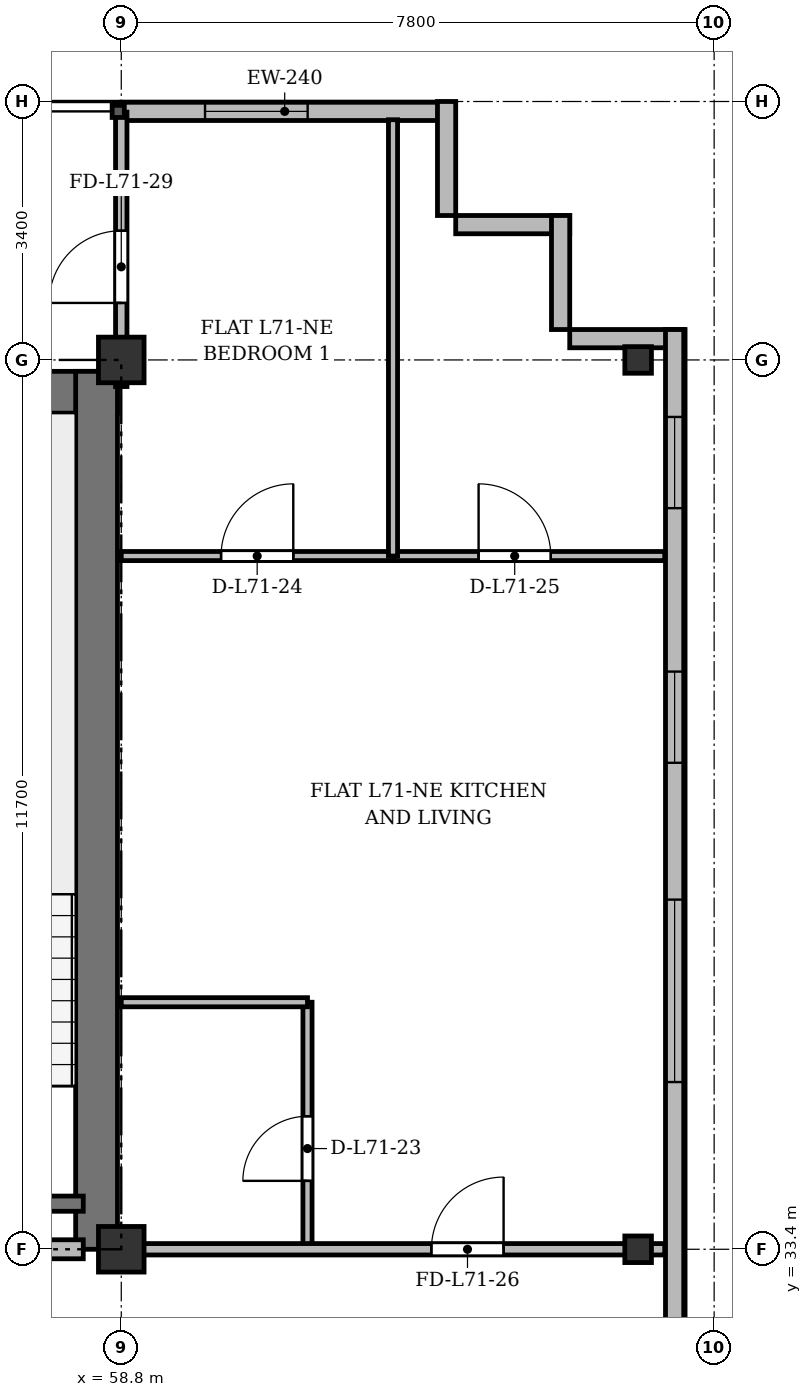
"""IFC4 building model, lengths in metres.
Left out: names, types, materials, properties, quantities, classifications, styles, units other than length and angle.
Written with IfcOpenShell. Run it as: python <this file> out.ifc"""

import sys

from ifc_helpers import new_model, si_unit, direction, frame, frame_2d, origin, origin_2d, place, context, subcontext, project, spatial, rectangle, i_section, extrude, source, transform, mapped, element, fill, save


model = new_model("IFC4")
c1 = context("Model", 3, precision=1e-05, world=origin(), true_north=direction((0.0, 1.0)))
c2 = subcontext(c1, "Body", "Model", "MODEL_VIEW")
j1 = project(units=[si_unit("LENGTHUNIT", "METRE"), si_unit("PLANEANGLEUNIT", "RADIAN")], contexts=[c1])
p1 = place(None, origin())
s1 = spatial("IfcSite", under=j1, at=p1, CompositionType="ELEMENT")
p2 = place(p1, origin())
s2 = spatial("IfcBuilding", under=s1, at=p2, CompositionType="ELEMENT")
p3 = place(p2, frame((0.0, 0.0, 273.9)))
s3 = spatial("IfcBuildingStorey", under=s2, at=p3, CompositionType="ELEMENT", Elevation=273.9)
m1 = source(origin(), c2, "Body", "SweptSolid", [
    extrude(rectangle(XDim=0.6, YDim=0.6, at=origin_2d()), origin(), (0.0, 0.0, 1.0), 3.6),
])
for number, where, z_axis, x_axis in (
    (1, (58.8, 33.4, 0.0), (0.0, 0.0, 1.0), (1.0, 0.0, 0.0)),
    (2, (58.8, 45.1, 0.0), (0.0, 0.0, 1.0), (1.0, 0.0, 0.0)),
):
    element("IfcColumn", number, at=place(p3, frame(where, z_axis=z_axis, x_axis=x_axis)), inside=s3, PredefinedType="COLUMN", context=c2, shape_type="MappedRepresentation", body=[
        mapped(m1, transform((0.0, 0.0, 0.0), x_axis=(1.0, 0.0, 0.0), y_axis=(0.0, 1.0, 0.0), z_axis=(0.0, 0.0, 1.0), scale=1.0)),
    ])
m2 = source(origin(), c2, "Body", "SweptSolid", [
    extrude(i_section(OverallWidth=0.35, OverallDepth=0.35, WebThickness=0.018, FlangeThickness=0.028, at=origin_2d()), origin(), (0.0, 0.0, 1.0), 3.6),
])
for number, where, z_axis, x_axis in (
    (3, (65.6, 33.4, 0.0), (0.0, 0.0, 1.0), (1.0, 0.0, 0.0)),
    (4, (65.6, 45.1, 0.0), (0.0, 0.0, 1.0), (1.0, 0.0, 0.0)),
):
    element("IfcColumn", number, at=place(p3, frame(where, z_axis=z_axis, x_axis=x_axis)), inside=s3, PredefinedType="COLUMN", context=c2, shape_type="MappedRepresentation", body=[
        mapped(m2, transform((0.0, 0.0, 0.0), x_axis=(1.0, 0.0, 0.0), y_axis=(0.0, 1.0, 0.0), z_axis=(0.0, 0.0, 1.0), scale=1.0)),
    ])
p4 = place(p3, frame((58.8, 48.37, 0.0), z_axis=(0.0, 0.0, 1.0), x_axis=(1.0, 0.0, 0.0)))
e5 = element("IfcWall", 5, at=p4, inside=s3, PredefinedType="SOLIDWALL", context=c2, shape_type="SweptSolid", body=[
    extrude(rectangle(XDim=4.3, YDim=0.24, at=frame_2d((2.15, 0.0))), origin(), (0.0, 0.0, 1.0), 3.37),
])
p5 = place(p4, frame((1.102, 0.0, 0.9)))
e6 = element("IfcOpeningElement", 6, at=p5, cuts=e5, PredefinedType="OPENING", context=c2, shape_type="SweptSolid", body=[
    extrude(rectangle(XDim=1.35, YDim=1.5, at=frame_2d((0.675, 0.75))), frame((0.0, 0.13, 0.0), z_axis=(0.0, -1.0, 0.0), x_axis=(1.0, 0.0, 0.0)), (0.0, 0.0, 1.0), 0.26),
])
for number, where, z_axis, x_axis in (
    (7, (63.08, 48.5, 0.0), (0.0, 0.0, 1.0), (0.0, -1.0, 0.0)),
    (8, (63.2, 46.88, 0.0), (0.0, 0.0, 1.0), (1.0, 0.0, 0.0)),
    (9, (64.58, 47.0, 0.0), (0.0, 0.0, 1.0), (0.0, -1.0, 0.0)),
    (10, (64.7, 45.38, 0.0), (0.0, 0.0, 1.0), (1.0, 0.0, 0.0)),
):
    element("IfcWall", number, at=place(p3, frame(where, z_axis=z_axis, x_axis=x_axis)), inside=s3, PredefinedType="SOLIDWALL", context=c2, shape_type="SweptSolid", body=[
        extrude(rectangle(XDim=1.5, YDim=0.24, at=frame_2d((0.75, 0.0))), origin(), (0.0, 0.0, 1.0), 3.37),
    ])
p6 = place(p3, frame((66.08, 45.5, 0.0), z_axis=(0.0, 0.0, 1.0), x_axis=(0.0, -1.0, 0.0)))
e11 = element("IfcWall", 11, at=p6, inside=s3, PredefinedType="SOLIDWALL", context=c2, shape_type="SweptSolid", body=[
    extrude(rectangle(XDim=39.0, YDim=0.24, at=frame_2d((19.5, 0.0))), origin(), (0.0, 0.0, 1.0), 3.37),
])
p7 = place(p6, frame((36.35, 0.0, 0.92)))
e12 = element("IfcOpeningElement", 12, at=p7, cuts=e11, PredefinedType="OPENING", context=c2, shape_type="SweptSolid", body=[
    extrude(rectangle(XDim=1.2, YDim=1.65, at=frame_2d((0.6, 0.825))), frame((0.0, 0.13, 0.0), z_axis=(0.0, -1.0, 0.0), x_axis=(1.0, 0.0, 0.0)), (0.0, 0.0, 1.0), 0.26),
])
p8 = place(p6, frame((32.9, 0.0, 0.92)))
e13 = element("IfcOpeningElement", 13, at=p8, cuts=e11, PredefinedType="OPENING", context=c2, shape_type="SweptSolid", body=[
    extrude(rectangle(XDim=2.4, YDim=2.1, at=frame_2d((1.2, 1.05))), frame((0.0, 0.13, 0.0), z_axis=(0.0, -1.0, 0.0), x_axis=(1.0, 0.0, 0.0)), (0.0, 0.0, 1.0), 0.26),
])
p9 = place(p6, frame((28.7, 0.0, 0.92)))
e14 = element("IfcOpeningElement", 14, at=p9, cuts=e11, PredefinedType="OPENING", context=c2, shape_type="SweptSolid", body=[
    extrude(rectangle(XDim=2.4, YDim=2.1, at=frame_2d((1.2, 1.05))), frame((0.0, 0.13, 0.0), z_axis=(0.0, -1.0, 0.0), x_axis=(1.0, 0.0, 0.0)), (0.0, 0.0, 1.0), 0.26),
])
p10 = place(p6, frame((21.5, 0.0, 0.92)))
e15 = element("IfcOpeningElement", 15, at=p10, cuts=e11, PredefinedType="OPENING", context=c2, shape_type="SweptSolid", body=[
    extrude(rectangle(XDim=2.4, YDim=2.1, at=frame_2d((1.2, 1.05))), frame((0.0, 0.13, 0.0), z_axis=(0.0, -1.0, 0.0), x_axis=(1.0, 0.0, 0.0)), (0.0, 0.0, 1.0), 0.26),
])
p11 = place(p6, frame((7.5, 0.0, 0.92)))
e16 = element("IfcOpeningElement", 16, at=p11, cuts=e11, PredefinedType="OPENING", context=c2, shape_type="SweptSolid", body=[
    extrude(rectangle(XDim=2.4, YDim=2.1, at=frame_2d((1.2, 1.05))), frame((0.0, 0.13, 0.0), z_axis=(0.0, -1.0, 0.0), x_axis=(1.0, 0.0, 0.0)), (0.0, 0.0, 1.0), 0.26),
])
p12 = place(p6, frame((4.5, 0.0, 0.92)))
e17 = element("IfcOpeningElement", 17, at=p12, cuts=e11, PredefinedType="OPENING", context=c2, shape_type="SweptSolid", body=[
    extrude(rectangle(XDim=1.2, YDim=1.65, at=frame_2d((0.6, 0.825))), frame((0.0, 0.13, 0.0), z_axis=(0.0, -1.0, 0.0), x_axis=(1.0, 0.0, 0.0)), (0.0, 0.0, 1.0), 0.26),
])
p13 = place(p6, frame((1.15, 0.0, 0.92)))
e18 = element("IfcOpeningElement", 18, at=p13, cuts=e11, PredefinedType="OPENING", context=c2, shape_type="SweptSolid", body=[
    extrude(rectangle(XDim=1.2, YDim=1.65, at=frame_2d((0.6, 0.825))), frame((0.0, 0.13, 0.0), z_axis=(0.0, -1.0, 0.0), x_axis=(1.0, 0.0, 0.0)), (0.0, 0.0, 1.0), 0.26),
])
p14 = place(p3, frame((15.65, 44.675, 0.0), z_axis=(0.0, 0.0, 1.0), x_axis=(1.0, 0.0, 0.0)))
e19 = element("IfcWall", 19, at=p14, inside=s3, PredefinedType="SHEAR", context=c2, shape_type="SweptSolid", body=[
    extrude(rectangle(XDim=43.1, YDim=0.55, at=frame_2d((21.55, 0.0))), origin(), (0.0, 0.0, 1.0), 3.37),
])
p15 = place(p3, frame((58.475, 33.4, 0.0), z_axis=(0.0, 0.0, 1.0), x_axis=(0.0, 1.0, 0.0)))
e20 = element("IfcWall", 20, at=p15, inside=s3, PredefinedType="SHEAR", context=c2, shape_type="SweptSolid", body=[
    extrude(rectangle(XDim=11.55, YDim=0.55, at=frame_2d((5.775, 0.0))), origin(), (0.0, 0.0, 1.0), 3.37),
])
p16 = place(p3, frame((54.9, 34.0, 0.0), z_axis=(0.0, 0.0, 1.0), x_axis=(1.0, 0.0, 0.0)))
e21 = element("IfcWall", 21, at=p16, inside=s3, PredefinedType="SHEAR", context=c2, shape_type="SweptSolid", body=[
    extrude(rectangle(XDim=3.4, YDim=0.2, at=frame_2d((1.7, 0.0))), origin(), (0.0, 0.0, 1.0), 3.37),
])
p17 = place(p3, frame((47.15, 33.4, 0.0), z_axis=(0.0, 0.0, 1.0), x_axis=(1.0, 0.0, 0.0)))
e22 = element("IfcWall", 22, at=p17, inside=s3, PredefinedType="PARTITIONING", context=c2, shape_type="SweptSolid", body=[
    extrude(rectangle(XDim=11.15, YDim=0.25, at=frame_2d((5.575, 0.0))), origin(), (0.0, 0.0, 1.0), 2.92),
])
p18 = place(p17, frame((0.7, 0.0, 0.0)))
e23 = element("IfcOpeningElement", 23, at=p18, cuts=e22, PredefinedType="OPENING", context=c2, shape_type="SweptSolid", body=[
    extrude(rectangle(XDim=0.95, YDim=2.15, at=frame_2d((0.475, 1.075))), frame((0.0, 0.135, 0.0), z_axis=(0.0, -1.0, 0.0), x_axis=(1.0, 0.0, 0.0)), (0.0, 0.0, 1.0), 0.27),
])
p19 = place(p17, frame((6.0, 0.0, 0.0)))
e24 = element("IfcOpeningElement", 24, at=p19, cuts=e22, PredefinedType="OPENING", context=c2, shape_type="SweptSolid", body=[
    extrude(rectangle(XDim=1.2, YDim=2.15, at=frame_2d((0.6, 1.075))), frame((0.0, 0.135, 0.0), z_axis=(0.0, -1.0, 0.0), x_axis=(1.0, 0.0, 0.0)), (0.0, 0.0, 1.0), 0.27),
])
p20 = place(p3, frame((61.25, 33.4, 0.0), z_axis=(0.0, 0.0, 1.0), x_axis=(0.0, 1.0, 0.0)))
e25 = element("IfcWall", 25, at=p20, inside=s3, PredefinedType="PARTITIONING", context=c2, shape_type="SweptSolid", body=[
    extrude(rectangle(XDim=3.25, YDim=0.12, at=frame_2d((1.625, 0.0))), origin(), (0.0, 0.0, 1.0), 2.92),
])
p21 = place(p20, frame((0.9, 0.0, 0.0)))
e26 = element("IfcOpeningElement", 26, at=p21, cuts=e25, PredefinedType="OPENING", context=c2, shape_type="SweptSolid", body=[
    extrude(rectangle(XDim=0.85, YDim=2.1, at=frame_2d((0.425, 1.05))), frame((0.0, 0.07, 0.0), z_axis=(0.0, -1.0, 0.0), x_axis=(1.0, 0.0, 0.0)), (0.0, 0.0, 1.0), 0.14),
])
p22 = place(p3, frame((58.8, 36.65, 0.0), z_axis=(0.0, 0.0, 1.0), x_axis=(1.0, 0.0, 0.0)))
e27 = element("IfcWall", 27, at=p22, inside=s3, PredefinedType="PARTITIONING", context=c2, shape_type="SweptSolid", body=[
    extrude(rectangle(XDim=2.45, YDim=0.12, at=frame_2d((1.225, 0.0))), origin(), (0.0, 0.0, 1.0), 2.87),
])
p23 = place(p3, frame((58.8, 42.52, 0.0), z_axis=(0.0, 0.0, 1.0), x_axis=(1.0, 0.0, 0.0)))
e28 = element("IfcWall", 28, at=p23, inside=s3, PredefinedType="PARTITIONING", context=c2, shape_type="SweptSolid", body=[
    extrude(rectangle(XDim=3.575, YDim=0.12, at=frame_2d((1.788, 0.0))), origin(), (0.0, 0.0, 1.0), 2.87),
])
p24 = place(p23, frame((1.313, 0.0, 0.0)))
e29 = element("IfcOpeningElement", 29, at=p24, cuts=e28, PredefinedType="OPENING", context=c2, shape_type="SweptSolid", body=[
    extrude(rectangle(XDim=0.95, YDim=2.15, at=frame_2d((0.475, 1.075))), frame((0.0, 0.07, 0.0), z_axis=(0.0, -1.0, 0.0), x_axis=(1.0, 0.0, 0.0)), (0.0, 0.0, 1.0), 0.14),
])
p25 = place(p3, frame((62.375, 42.52, 0.0), z_axis=(0.0, 0.0, 1.0), x_axis=(1.0, 0.0, 0.0)))
e30 = element("IfcWall", 30, at=p25, inside=s3, PredefinedType="PARTITIONING", context=c2, shape_type="SweptSolid", body=[
    extrude(rectangle(XDim=3.575, YDim=0.12, at=frame_2d((1.788, 0.0))), origin(), (0.0, 0.0, 1.0), 2.87),
])
p26 = place(p25, frame((1.126, 0.0, 0.0)))
e31 = element("IfcOpeningElement", 31, at=p26, cuts=e30, PredefinedType="OPENING", context=c2, shape_type="SweptSolid", body=[
    extrude(rectangle(XDim=0.95, YDim=2.15, at=frame_2d((0.475, 1.075))), frame((0.0, 0.07, 0.0), z_axis=(0.0, -1.0, 0.0), x_axis=(1.0, 0.0, 0.0)), (0.0, 0.0, 1.0), 0.14),
])
p27 = place(p3, frame((62.375, 42.52, 0.0), z_axis=(0.0, 0.0, 1.0), x_axis=(0.0, 1.0, 0.0)))
e32 = element("IfcWall", 32, at=p27, inside=s3, PredefinedType="PARTITIONING", context=c2, shape_type="SweptSolid", body=[
    extrude(rectangle(XDim=5.74, YDim=0.12, at=frame_2d((2.87, 0.0))), origin(), (0.0, 0.0, 1.0), 2.92),
])
p28 = place(p3, frame((58.8, 33.4, 0.0), z_axis=(0.0, 0.0, 1.0), x_axis=(1.0, 0.0, 0.0)))
e33 = element("IfcWall", 33, at=p28, inside=s3, PredefinedType="PARTITIONING", context=c2, shape_type="SweptSolid", body=[
    extrude(rectangle(XDim=7.15, YDim=0.15, at=frame_2d((3.575, 0.0))), origin(), (0.0, 0.0, 1.0), 2.92),
])
p29 = place(p28, frame((4.08, 0.0, 0.0)))
e34 = element("IfcOpeningElement", 34, at=p29, cuts=e33, PredefinedType="OPENING", context=c2, shape_type="SweptSolid", body=[
    extrude(rectangle(XDim=0.95, YDim=2.15, at=frame_2d((0.475, 1.075))), frame((0.0, 0.085, 0.0), z_axis=(0.0, -1.0, 0.0), x_axis=(1.0, 0.0, 0.0)), (0.0, 0.0, 1.0), 0.17),
])
p30 = place(p3, frame((58.8, 44.75, 0.0), z_axis=(0.0, 0.0, 1.0), x_axis=(0.0, 1.0, 0.0)))
e35 = element("IfcWall", 35, at=p30, inside=s3, PredefinedType="PARTITIONING", context=c2, shape_type="SweptSolid", body=[
    extrude(rectangle(XDim=3.61, YDim=0.15, at=frame_2d((1.805, 0.0))), origin(), (0.0, 0.0, 1.0), 2.87),
])
p31 = place(p30, frame((1.1, 0.0, 0.0)))
e36 = element("IfcOpeningElement", 36, at=p31, cuts=e35, PredefinedType="OPENING", context=c2, shape_type="SweptSolid", body=[
    extrude(rectangle(XDim=0.95, YDim=2.15, at=frame_2d((0.475, 1.075))), frame((0.0, 0.085, 0.0), z_axis=(0.0, -1.0, 0.0), x_axis=(1.0, 0.0, 0.0)), (0.0, 0.0, 1.0), 0.17),
])
m3 = source(origin(), c2, "Body", "SweptSolid", [
    extrude(rectangle(XDim=1.35, YDim=1.5, at=frame_2d((0.675, 0.75))), frame((0.0, 0.03, 0.0), z_axis=(0.0, -1.0, 0.0), x_axis=(1.0, 0.0, 0.0)), (0.0, 0.0, 1.0), 0.06),
])
p32 = place(p5, origin())
e37 = element("IfcWindow", 37, at=p32, inside=s3, PartitioningType="SINGLE_PANEL", PredefinedType="WINDOW", context=c2, shape_type="MappedRepresentation", body=[
    mapped(m3, transform((0.0, 0.0, 0.0), x_axis=(1.0, 0.0, 0.0), y_axis=(0.0, 1.0, 0.0), z_axis=(0.0, 0.0, 1.0), scale=1.0)),
])
fill(e6, e37)
m4 = source(origin(), c2, "Body", "SweptSolid", [
    extrude(rectangle(XDim=2.4, YDim=2.1, at=frame_2d((1.2, 1.05))), frame((0.0, 0.03, 0.0), z_axis=(0.0, -1.0, 0.0), x_axis=(1.0, 0.0, 0.0)), (0.0, 0.0, 1.0), 0.06),
])
p33 = place(p11, origin())
e38 = element("IfcWindow", 38, at=p33, inside=s3, PartitioningType="SINGLE_PANEL", PredefinedType="WINDOW", context=c2, shape_type="MappedRepresentation", body=[
    mapped(m4, transform((0.0, 0.0, 0.0), x_axis=(1.0, 0.0, 0.0), y_axis=(0.0, 1.0, 0.0), z_axis=(0.0, 0.0, 1.0), scale=1.0)),
])
fill(e16, e38)
m5 = source(origin(), c2, "Body", "SweptSolid", [
    extrude(rectangle(XDim=1.2, YDim=1.65, at=frame_2d((0.6, 0.825))), frame((0.0, 0.03, 0.0), z_axis=(0.0, -1.0, 0.0), x_axis=(1.0, 0.0, 0.0)), (0.0, 0.0, 1.0), 0.06),
])
p34 = place(p12, origin())
e39 = element("IfcWindow", 39, at=p34, inside=s3, PartitioningType="SINGLE_PANEL", PredefinedType="WINDOW", context=c2, shape_type="MappedRepresentation", body=[
    mapped(m5, transform((0.0, 0.0, 0.0), x_axis=(1.0, 0.0, 0.0), y_axis=(0.0, 1.0, 0.0), z_axis=(0.0, 0.0, 1.0), scale=1.0)),
])
fill(e17, e39)
p35 = place(p13, origin())
e40 = element("IfcWindow", 40, at=p35, inside=s3, PartitioningType="SINGLE_PANEL", PredefinedType="WINDOW", context=c2, shape_type="MappedRepresentation", body=[
    mapped(m5, transform((0.0, 0.0, 0.0), x_axis=(1.0, 0.0, 0.0), y_axis=(0.0, 1.0, 0.0), z_axis=(0.0, 0.0, 1.0), scale=1.0)),
])
fill(e18, e40)
m6 = source(origin(), c2, "Body", "SweptSolid", [
    extrude(rectangle(XDim=0.85, YDim=2.1, at=frame_2d((0.425, 1.05))), frame((0.0, 0.025, 0.0), z_axis=(0.0, -1.0, 0.0), x_axis=(1.0, 0.0, 0.0)), (0.0, 0.0, 1.0), 0.05),
])
p36 = place(p21, origin())
e41 = element("IfcDoor", 41, at=p36, inside=s3, OperationType="SINGLE_SWING_LEFT", PredefinedType="DOOR", context=c2, shape_type="MappedRepresentation", body=[
    mapped(m6, transform((0.0, 0.0, 0.0), x_axis=(1.0, 0.0, 0.0), y_axis=(0.0, 1.0, 0.0), z_axis=(0.0, 0.0, 1.0), scale=1.0)),
])
fill(e26, e41)
m7 = source(origin(), c2, "Body", "SweptSolid", [
    extrude(rectangle(XDim=0.95, YDim=2.15, at=frame_2d((0.475, 1.075))), frame((0.0, 0.025, 0.0), z_axis=(0.0, -1.0, 0.0), x_axis=(1.0, 0.0, 0.0)), (0.0, 0.0, 1.0), 0.05),
])
p37 = place(p24, origin())
e42 = element("IfcDoor", 42, at=p37, inside=s3, OperationType="SINGLE_SWING_RIGHT", PredefinedType="DOOR", context=c2, shape_type="MappedRepresentation", body=[
    mapped(m7, transform((0.0, 0.0, 0.0), x_axis=(1.0, 0.0, 0.0), y_axis=(0.0, 1.0, 0.0), z_axis=(0.0, 0.0, 1.0), scale=1.0)),
])
fill(e29, e42)
p38 = place(p26, origin())
e43 = element("IfcDoor", 43, at=p38, inside=s3, OperationType="SINGLE_SWING_LEFT", PredefinedType="DOOR", context=c2, shape_type="MappedRepresentation", body=[
    mapped(m7, transform((0.0, 0.0, 0.0), x_axis=(1.0, 0.0, 0.0), y_axis=(0.0, 1.0, 0.0), z_axis=(0.0, 0.0, 1.0), scale=1.0)),
])
fill(e31, e43)
p39 = place(p29, origin())
e44 = element("IfcDoor", 44, at=p39, inside=s3, OperationType="SINGLE_SWING_RIGHT", PredefinedType="DOOR", context=c2, shape_type="MappedRepresentation", body=[
    mapped(m7, transform((0.0, 0.0, 0.0), x_axis=(1.0, 0.0, 0.0), y_axis=(0.0, 1.0, 0.0), z_axis=(0.0, 0.0, 1.0), scale=1.0)),
])
fill(e34, e44)
p40 = place(p31, origin())
e45 = element("IfcDoor", 45, at=p40, inside=s3, OperationType="SINGLE_SWING_LEFT", PredefinedType="DOOR", context=c2, shape_type="MappedRepresentation", body=[
    mapped(m7, transform((0.0, 0.0, 0.0), x_axis=(1.0, 0.0, 0.0), y_axis=(0.0, 1.0, 0.0), z_axis=(0.0, 0.0, 1.0), scale=1.0)),
])
fill(e36, e45)
save(model, sys.argv[1])
